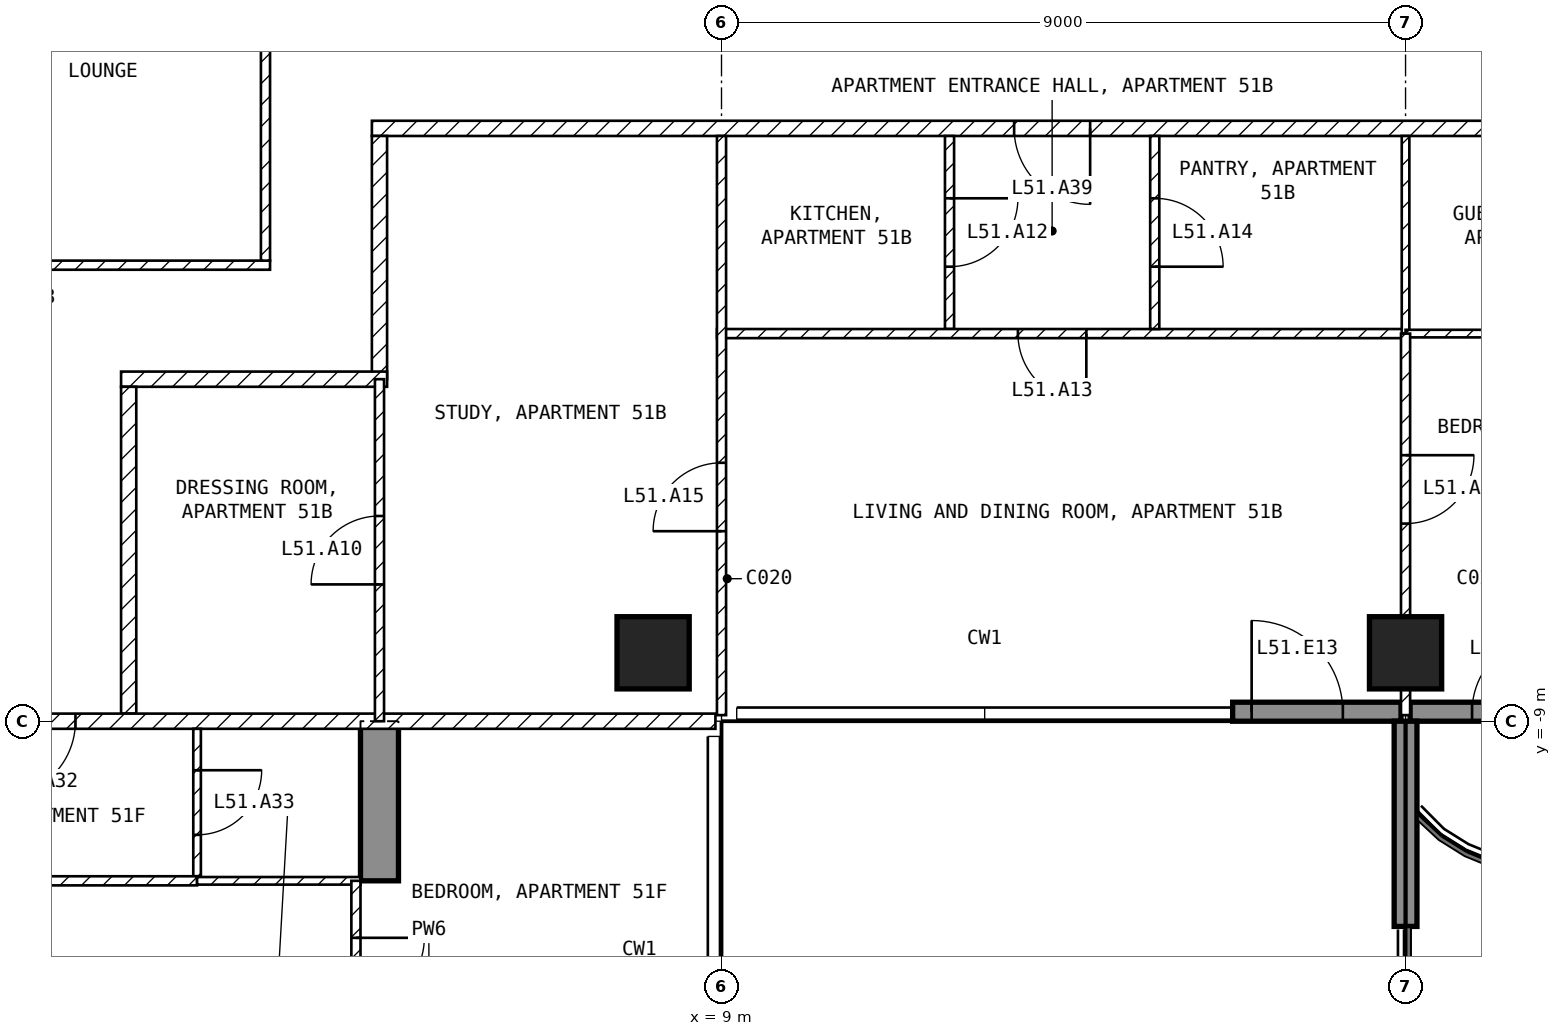
"""IFC4 building model, lengths in metres.
Left out: names, types, materials, properties, quantities, classifications, styles, units other than length and angle.
Written with IfcOpenShell. Run it as: python <this file> out.ifc"""

import sys

from ifc_helpers import new_model, si_unit, direction, frame, frame_2d, origin, origin_2d, place, context, subcontext, project, spatial, polyline, rectangle, outline, extrude, element, fill, save


model = new_model("IFC4")
c1 = context("Model", 3, precision=1e-05, world=origin(), true_north=direction((0.0, 1.0)))
c2 = subcontext(c1, "Body", "Model", "MODEL_VIEW")
j1 = project(units=[si_unit("LENGTHUNIT", "METRE"), si_unit("PLANEANGLEUNIT", "RADIAN")], contexts=[c1])
p1 = place(None, origin())
s1 = spatial("IfcSite", under=j1, at=p1, CompositionType="ELEMENT")
p2 = place(p1, origin())
s2 = spatial("IfcBuilding", under=s1, at=p2, CompositionType="ELEMENT")
p3 = place(p2, frame((0.0, 0.0, 205.1)))
s3 = spatial("IfcBuildingStorey", under=s2, at=p3, CompositionType="ELEMENT", Elevation=205.1)
for number, where, z_axis, x_axis in (
    (1, (8.1, -8.1, -0.25), (0.0, 0.0, 1.0), (1.0, 0.0, 0.0)),
    (2, (18.0, -8.1, -0.25), (0.0, 0.0, 1.0), (1.0, 0.0, 0.0)),
):
    element("IfcColumn", number, at=place(p3, frame(where, z_axis=z_axis, x_axis=x_axis)), inside=s3, PredefinedType="COLUMN", context=c2, shape_type="SweptSolid", body=[
        extrude(rectangle(XDim=0.95, YDim=0.95, at=origin_2d()), origin(), (0.0, 0.0, 1.0), 3.5),
    ])
p4 = place(p3, frame((4.25, -20.225, -0.25), z_axis=(1.0, 0.0, 0.0), x_axis=(0.0, 1.0, 0.0)))
e3 = element("IfcWall", 3, at=p4, inside=s3, PredefinedType="SHEAR", context=c2, shape_type="SweptSolid", body=[
    extrude(outline(polyline([(0.0, 0.0), (6.725, 0.0), (6.725, 2.65), (9.125, 2.65), (9.125, 0.0), (11.225, 0.0), (11.225, 3.5), (0.0, 3.5), (0.0, 0.0)])), origin(), (0.0, 0.0, 1.0), 0.5),
])
p5 = place(p3, frame((15.725, -8.875, 0.0), z_axis=(0.0, 0.0, 1.0), x_axis=(1.0, 0.0, 0.0)))
e4 = element("IfcWall", 4, at=p5, inside=s3, PredefinedType="SOLIDWALL", context=c2, shape_type="SweptSolid", body=[
    extrude(rectangle(XDim=2.215, YDim=0.25, at=frame_2d((1.107, 0.0))), origin(), (0.0, 0.0, 1.0), 3.25),
])
p6 = place(p5, frame((0.25, 0.0, 0.0)))
e5 = element("IfcOpeningElement", 5, at=p6, cuts=e4, PredefinedType="OPENING", context=c2, shape_type="SweptSolid", body=[
    extrude(rectangle(XDim=1.2, YDim=2.4, at=frame_2d((0.6, 1.2))), frame((0.0, 0.135, 0.0), z_axis=(0.0, -1.0, 0.0), x_axis=(1.0, 0.0, 0.0)), (0.0, 0.0, 1.0), 0.27),
])
p7 = place(p3, frame((18.06, -8.875, 0.0), z_axis=(0.0, 0.0, 1.0), x_axis=(1.0, 0.0, 0.0)))
e6 = element("IfcWall", 6, at=p7, inside=s3, PredefinedType="SOLIDWALL", context=c2, shape_type="SweptSolid", body=[
    extrude(rectangle(XDim=3.115, YDim=0.25, at=frame_2d((1.558, 0.0))), origin(), (0.0, 0.0, 1.0), 3.25),
])
p8 = place(p7, frame((0.815, 0.0, 0.0)))
e7 = element("IfcOpeningElement", 7, at=p8, cuts=e6, PredefinedType="OPENING", context=c2, shape_type="SweptSolid", body=[
    extrude(rectangle(XDim=1.0, YDim=2.4, at=frame_2d((0.5, 1.2))), frame((0.0, 0.135, 0.0), z_axis=(0.0, -1.0, 0.0), x_axis=(1.0, 0.0, 0.0)), (0.0, 0.0, 1.0), 0.27),
])
p9 = place(p3, frame((18.0, -9.0, 0.0), z_axis=(0.0, 0.0, 1.0), x_axis=(0.0, -1.0, 0.0)))
e8 = element("IfcWall", 8, at=p9, inside=s3, PredefinedType="SOLIDWALL", context=c2, shape_type="SweptSolid", body=[
    extrude(rectangle(XDim=2.7, YDim=0.3, at=frame_2d((1.35, 0.0))), origin(), (0.0, 0.0, 1.0), 3.25),
])
p10 = place(p3, frame((-3.06, -3.0, 0.0), z_axis=(0.0, 0.0, 1.0), x_axis=(1.0, 0.0, 0.0)))
e9 = element("IfcWall", 9, at=p10, inside=s3, PredefinedType="PARTITIONING", context=c2, shape_type="SweptSolid", body=[
    extrude(rectangle(XDim=6.12, YDim=0.12, at=frame_2d((3.06, 0.0))), origin(), (0.0, 0.0, 1.0), 3.25),
])
p11 = place(p3, frame((3.0, -2.94, 0.0), z_axis=(0.0, 0.0, 1.0), x_axis=(0.0, 1.0, 0.0)))
e10 = element("IfcWall", 10, at=p11, inside=s3, PredefinedType="PARTITIONING", context=c2, shape_type="SweptSolid", body=[
    extrude(rectangle(XDim=5.88, YDim=0.12, at=frame_2d((2.94, 0.0))), origin(), (0.0, 0.0, 1.0), 3.25),
])
p12 = place(p3, frame((21.6, -1.2, 0.0), z_axis=(0.0, 0.0, 1.0), x_axis=(-1.0, 0.0, 0.0)))
e11 = element("IfcWall", 11, at=p12, inside=s3, PredefinedType="PARTITIONING", context=c2, shape_type="SweptSolid", body=[
    extrude(rectangle(XDim=17.2, YDim=0.2, at=frame_2d((8.6, 0.0))), origin(), (0.0, 0.0, 1.0), 3.25),
])
p13 = place(p12, frame((7.75, 0.0, 0.0)))
e12 = element("IfcOpeningElement", 12, at=p13, cuts=e11, PredefinedType="OPENING", context=c2, shape_type="SweptSolid", body=[
    extrude(rectangle(XDim=1.0, YDim=2.1, at=frame_2d((0.5, 1.05))), frame((0.0, 0.11, 0.0), z_axis=(0.0, -1.0, 0.0), x_axis=(1.0, 0.0, 0.0)), (0.0, 0.0, 1.0), 0.22),
])
p14 = place(p3, frame((4.5, -1.3, 0.0), z_axis=(0.0, 0.0, 1.0), x_axis=(0.0, -1.0, 0.0)))
e13 = element("IfcWall", 13, at=p14, inside=s3, PredefinedType="PARTITIONING", context=c2, shape_type="SweptSolid", body=[
    extrude(rectangle(XDim=3.2, YDim=0.2, at=frame_2d((1.6, 0.0))), origin(), (0.0, 0.0, 1.0), 3.25),
])
p15 = place(p3, frame((4.6, -4.5, 0.0), z_axis=(0.0, 0.0, 1.0), x_axis=(-1.0, 0.0, 0.0)))
e14 = element("IfcWall", 14, at=p15, inside=s3, PredefinedType="PARTITIONING", context=c2, shape_type="SweptSolid", body=[
    extrude(rectangle(XDim=3.5, YDim=0.2, at=frame_2d((1.75, 0.0))), origin(), (0.0, 0.0, 1.0), 3.25),
])
p16 = place(p3, frame((1.2, -4.6, 0.0), z_axis=(0.0, 0.0, 1.0), x_axis=(0.0, -1.0, 0.0)))
e15 = element("IfcWall", 15, at=p16, inside=s3, PredefinedType="PARTITIONING", context=c2, shape_type="SweptSolid", body=[
    extrude(rectangle(XDim=4.3, YDim=0.2, at=frame_2d((2.15, 0.0))), origin(), (0.0, 0.0, 1.0), 3.25),
])
p17 = place(p3, frame((8.92, -9.0, 0.0), z_axis=(0.0, 0.0, 1.0), x_axis=(-1.0, 0.0, 0.0)))
e16 = element("IfcWall", 16, at=p17, inside=s3, PredefinedType="PARTITIONING", context=c2, shape_type="SweptSolid", body=[
    extrude(rectangle(XDim=17.84, YDim=0.2, at=frame_2d((8.92, 0.0))), origin(), (0.0, 0.0, 1.0), 3.25),
])
p18 = place(p17, frame((8.42, 0.0, 0.0)))
e17 = element("IfcOpeningElement", 17, at=p18, cuts=e16, PredefinedType="OPENING", context=c2, shape_type="SweptSolid", body=[
    extrude(rectangle(XDim=1.0, YDim=2.1, at=frame_2d((0.5, 1.05))), frame((0.0, 0.11, 0.0), z_axis=(0.0, -1.0, 0.0), x_axis=(1.0, 0.0, 0.0)), (0.0, 0.0, 1.0), 0.22),
])
p19 = place(p3, frame((12.0, -1.3, 0.0), z_axis=(0.0, 0.0, 1.0), x_axis=(0.0, -1.0, 0.0)))
e18 = element("IfcWall", 18, at=p19, inside=s3, PredefinedType="PARTITIONING", context=c2, shape_type="SweptSolid", body=[
    extrude(rectangle(XDim=2.54, YDim=0.12, at=frame_2d((1.27, 0.0))), origin(), (0.0, 0.0, 1.0), 3.25),
])
p20 = place(p19, frame((0.82, 0.0, 0.0)))
e19 = element("IfcOpeningElement", 19, at=p20, cuts=e18, PredefinedType="OPENING", context=c2, shape_type="SweptSolid", body=[
    extrude(rectangle(XDim=0.9, YDim=2.1, at=frame_2d((0.45, 1.05))), frame((0.0, 0.07, 0.0), z_axis=(0.0, -1.0, 0.0), x_axis=(1.0, 0.0, 0.0)), (0.0, 0.0, 1.0), 0.14),
])
p21 = place(p3, frame((18.0, -3.9, 0.0), z_axis=(0.0, 0.0, 1.0), x_axis=(-1.0, 0.0, 0.0)))
e20 = element("IfcWall", 20, at=p21, inside=s3, PredefinedType="PARTITIONING", context=c2, shape_type="SweptSolid", body=[
    extrude(rectangle(XDim=9.06, YDim=0.12, at=frame_2d((4.53, 0.0))), origin(), (0.0, 0.0, 1.0), 3.25),
])
p22 = place(p21, frame((4.2, 0.0, 0.0)))
e21 = element("IfcOpeningElement", 21, at=p22, cuts=e20, PredefinedType="OPENING", context=c2, shape_type="SweptSolid", body=[
    extrude(rectangle(XDim=0.9, YDim=2.1, at=frame_2d((0.45, 1.05))), frame((0.0, 0.07, 0.0), z_axis=(0.0, -1.0, 0.0), x_axis=(1.0, 0.0, 0.0)), (0.0, 0.0, 1.0), 0.14),
])
p23 = place(p3, frame((9.0, -8.92, 0.0), z_axis=(0.0, 0.0, 1.0), x_axis=(0.0, 1.0, 0.0)))
e22 = element("IfcWall", 22, at=p23, inside=s3, PredefinedType="PARTITIONING", context=c2, shape_type="SweptSolid", body=[
    extrude(rectangle(XDim=7.62, YDim=0.12, at=frame_2d((3.81, 0.0))), origin(), (0.0, 0.0, 1.0), 3.25),
])
p24 = place(p23, frame((2.42, 0.0, 0.0)))
e23 = element("IfcOpeningElement", 23, at=p24, cuts=e22, PredefinedType="OPENING", context=c2, shape_type="SweptSolid", body=[
    extrude(rectangle(XDim=0.9, YDim=2.1, at=frame_2d((0.45, 1.05))), frame((0.0, 0.07, 0.0), z_axis=(0.0, -1.0, 0.0), x_axis=(1.0, 0.0, 0.0)), (0.0, 0.0, 1.0), 0.14),
])
p25 = place(p3, frame((14.7, -1.3, 0.0), z_axis=(0.0, 0.0, 1.0), x_axis=(0.0, -1.0, 0.0)))
e24 = element("IfcWall", 24, at=p25, inside=s3, PredefinedType="PARTITIONING", context=c2, shape_type="SweptSolid", body=[
    extrude(rectangle(XDim=2.54, YDim=0.12, at=frame_2d((1.27, 0.0))), origin(), (0.0, 0.0, 1.0), 3.25),
])
p26 = place(p25, frame((0.82, 0.0, 0.0)))
e25 = element("IfcOpeningElement", 25, at=p26, cuts=e24, PredefinedType="OPENING", context=c2, shape_type="SweptSolid", body=[
    extrude(rectangle(XDim=0.9, YDim=2.1, at=frame_2d((0.45, 1.05))), frame((0.0, 0.07, 0.0), z_axis=(0.0, -1.0, 0.0), x_axis=(1.0, 0.0, 0.0)), (0.0, 0.0, 1.0), 0.14),
])
p27 = place(p3, frame((18.0, -1.3, 0.0), z_axis=(0.0, 0.0, 1.0), x_axis=(0.0, -1.0, 0.0)))
e26 = element("IfcWall", 26, at=p27, inside=s3, PredefinedType="PARTITIONING", context=c2, shape_type="SweptSolid", body=[
    extrude(rectangle(XDim=2.6, YDim=0.1, at=frame_2d((1.3, 0.0))), origin(), (0.0, 0.0, 1.0), 2.48),
])
p28 = place(p3, frame((21.6, -3.9, 0.0), z_axis=(0.0, 0.0, 1.0), x_axis=(-1.0, 0.0, 0.0)))
e27 = element("IfcWall", 27, at=p28, inside=s3, PredefinedType="PARTITIONING", context=c2, shape_type="SweptSolid", body=[
    extrude(rectangle(XDim=3.6, YDim=0.1, at=frame_2d((1.8, 0.0))), origin(), (0.0, 0.0, 1.0), 3.25),
])
p29 = place(p28, frame((1.375, 0.0, 0.0)))
e28 = element("IfcOpeningElement", 28, at=p29, cuts=e27, PredefinedType="OPENING", context=c2, shape_type="SweptSolid", body=[
    extrude(rectangle(XDim=0.85, YDim=2.1, at=frame_2d((0.425, 1.05))), frame((0.0, 0.06, 0.0), z_axis=(0.0, -1.0, 0.0), x_axis=(1.0, 0.0, 0.0)), (0.0, 0.0, 1.0), 0.12),
])
p30 = place(p3, frame((18.0, -3.9, 0.0), z_axis=(0.0, 0.0, 1.0), x_axis=(0.0, -1.0, 0.0)))
e29 = element("IfcWall", 29, at=p30, inside=s3, PredefinedType="PARTITIONING", context=c2, shape_type="SweptSolid", body=[
    extrude(rectangle(XDim=5.02, YDim=0.12, at=frame_2d((2.51, 0.0))), origin(), (0.0, 0.0, 1.0), 2.48),
])
p31 = place(p30, frame((1.6, 0.0, 0.0)))
e30 = element("IfcOpeningElement", 30, at=p31, cuts=e29, PredefinedType="OPENING", context=c2, shape_type="SweptSolid", body=[
    extrude(rectangle(XDim=0.9, YDim=2.1, at=frame_2d((0.45, 1.05))), frame((0.0, 0.07, 0.0), z_axis=(0.0, -1.0, 0.0), x_axis=(1.0, 0.0, 0.0)), (0.0, 0.0, 1.0), 0.14),
])
p32 = place(p3, frame((4.5, -9.0, 0.0), z_axis=(0.0, 0.0, 1.0), x_axis=(0.0, 1.0, 0.0)))
e31 = element("IfcWall", 31, at=p32, inside=s3, PredefinedType="PARTITIONING", context=c2, shape_type="SweptSolid", body=[
    extrude(rectangle(XDim=4.5, YDim=0.12, at=frame_2d((2.25, 0.0))), origin(), (0.0, 0.0, 1.0), 3.25),
])
p33 = place(p32, frame((1.8, 0.0, 0.0)))
e32 = element("IfcOpeningElement", 32, at=p33, cuts=e31, PredefinedType="OPENING", context=c2, shape_type="SweptSolid", body=[
    extrude(rectangle(XDim=0.9, YDim=2.1, at=frame_2d((0.45, 1.05))), frame((0.0, 0.07, 0.0), z_axis=(0.0, -1.0, 0.0), x_axis=(1.0, 0.0, 0.0)), (0.0, 0.0, 1.0), 0.14),
])
p34 = place(p3, frame((2.1, -9.1, 0.0), z_axis=(0.0, 0.0, 1.0), x_axis=(0.0, -1.0, 0.0)))
e33 = element("IfcWall", 33, at=p34, inside=s3, PredefinedType="PARTITIONING", context=c2, shape_type="SweptSolid", body=[
    extrude(rectangle(XDim=1.94, YDim=0.1, at=frame_2d((0.97, 0.0))), origin(), (0.0, 0.0, 1.0), 3.25),
])
p35 = place(p34, frame((0.545, 0.0, 0.0)))
e34 = element("IfcOpeningElement", 34, at=p35, cuts=e33, PredefinedType="OPENING", context=c2, shape_type="SweptSolid", body=[
    extrude(rectangle(XDim=0.85, YDim=2.1, at=frame_2d((0.425, 1.05))), frame((0.0, 0.06, 0.0), z_axis=(0.0, -1.0, 0.0), x_axis=(1.0, 0.0, 0.0)), (0.0, 0.0, 1.0), 0.12),
])
p36 = place(p3, frame((2.1, -11.1, 0.0), z_axis=(0.0, 0.0, 1.0), x_axis=(-1.0, 0.0, 0.0)))
e35 = element("IfcWall", 35, at=p36, inside=s3, PredefinedType="PARTITIONING", context=c2, shape_type="SweptSolid", body=[
    extrude(rectangle(XDim=6.35, YDim=0.12, at=frame_2d((3.175, 0.0))), origin(), (0.0, 0.0, 1.0), 3.25),
])
p37 = place(p36, frame((2.725, 0.0, 0.0)))
e36 = element("IfcOpeningElement", 36, at=p37, cuts=e35, PredefinedType="OPENING", context=c2, shape_type="SweptSolid", body=[
    extrude(rectangle(XDim=0.9, YDim=2.1, at=frame_2d((0.45, 1.05))), frame((0.0, 0.07, 0.0), z_axis=(0.0, -1.0, 0.0), x_axis=(1.0, 0.0, 0.0)), (0.0, 0.0, 1.0), 0.14),
])
p38 = place(p3, frame((4.25, -11.1, 0.0), z_axis=(0.0, 0.0, 1.0), x_axis=(-1.0, 0.0, 0.0)))
e37 = element("IfcWall", 37, at=p38, inside=s3, PredefinedType="PARTITIONING", context=c2, shape_type="SweptSolid", body=[
    extrude(rectangle(XDim=2.15, YDim=0.1, at=frame_2d((1.075, 0.0))), origin(), (0.0, 0.0, 1.0), 3.25),
])
p39 = place(p3, frame((4.19, -11.1, 0.0), z_axis=(0.0, 0.0, 1.0), x_axis=(0.0, -1.0, 0.0)))
e38 = element("IfcWall", 38, at=p39, inside=s3, PredefinedType="PARTITIONING", context=c2, shape_type="SweptSolid", body=[
    extrude(rectangle(XDim=2.4, YDim=0.12, at=frame_2d((1.2, 0.0))), origin(), (0.0, 0.0, 1.0), 2.4),
])
p40 = place(p39, frame((0.75, 0.0, 0.0)))
e39 = element("IfcOpeningElement", 39, at=p40, cuts=e38, PredefinedType="OPENING", context=c2, shape_type="SweptSolid", body=[
    extrude(rectangle(XDim=0.9, YDim=2.1, at=frame_2d((0.45, 1.05))), frame((0.0, 0.07, 0.0), z_axis=(0.0, -1.0, 0.0), x_axis=(1.0, 0.0, 0.0)), (0.0, 0.0, 1.0), 0.14),
])
p41 = place(p6, origin())
e40 = element("IfcDoor", 40, at=p41, inside=s3, OperationType="SINGLE_SWING_LEFT", PredefinedType="DOOR", context=c2, shape_type="SweptSolid", body=[
    extrude(rectangle(XDim=1.2, YDim=2.4, at=frame_2d((0.6, 1.2))), frame((0.0, 0.025, 0.0), z_axis=(0.0, -1.0, 0.0), x_axis=(1.0, 0.0, 0.0)), (0.0, 0.0, 1.0), 0.05),
])
fill(e5, e40)
p42 = place(p8, origin())
e41 = element("IfcDoor", 41, at=p42, inside=s3, OperationType="SINGLE_SWING_RIGHT", PredefinedType="DOOR", context=c2, shape_type="SweptSolid", body=[
    extrude(rectangle(XDim=1.0, YDim=2.4, at=frame_2d((0.5, 1.2))), frame((0.0, 0.025, 0.0), z_axis=(0.0, -1.0, 0.0), x_axis=(1.0, 0.0, 0.0)), (0.0, 0.0, 1.0), 0.05),
])
fill(e7, e41)
p43 = place(p31, origin())
e42 = element("IfcDoor", 42, at=p43, inside=s3, OperationType="SINGLE_SWING_LEFT", PredefinedType="DOOR", context=c2, shape_type="SweptSolid", body=[
    extrude(rectangle(XDim=0.9, YDim=2.1, at=frame_2d((0.45, 1.05))), frame((0.0, 0.025, 0.0), z_axis=(0.0, -1.0, 0.0), x_axis=(1.0, 0.0, 0.0)), (0.0, 0.0, 1.0), 0.05),
])
fill(e30, e42)
p44 = place(p33, origin())
e43 = element("IfcDoor", 43, at=p44, inside=s3, OperationType="SINGLE_SWING_LEFT", PredefinedType="DOOR", context=c2, shape_type="SweptSolid", body=[
    extrude(rectangle(XDim=0.9, YDim=2.1, at=frame_2d((0.45, 1.05))), frame((0.0, 0.025, 0.0), z_axis=(0.0, -1.0, 0.0), x_axis=(1.0, 0.0, 0.0)), (0.0, 0.0, 1.0), 0.05),
])
fill(e32, e43)
p45 = place(p20, origin())
e44 = element("IfcDoor", 44, at=p45, inside=s3, OperationType="SINGLE_SWING_LEFT", PredefinedType="DOOR", context=c2, shape_type="SweptSolid", body=[
    extrude(rectangle(XDim=0.9, YDim=2.1, at=frame_2d((0.45, 1.05))), frame((0.0, 0.025, 0.0), z_axis=(0.0, -1.0, 0.0), x_axis=(1.0, 0.0, 0.0)), (0.0, 0.0, 1.0), 0.05),
])
fill(e19, e44)
p46 = place(p22, origin())
e45 = element("IfcDoor", 45, at=p46, inside=s3, OperationType="SINGLE_SWING_LEFT", PredefinedType="DOOR", context=c2, shape_type="SweptSolid", body=[
    extrude(rectangle(XDim=0.9, YDim=2.1, at=frame_2d((0.45, 1.05))), frame((0.0, 0.025, 0.0), z_axis=(0.0, -1.0, 0.0), x_axis=(1.0, 0.0, 0.0)), (0.0, 0.0, 1.0), 0.05),
])
fill(e21, e45)
p47 = place(p26, origin())
e46 = element("IfcDoor", 46, at=p47, inside=s3, OperationType="SINGLE_SWING_RIGHT", PredefinedType="DOOR", context=c2, shape_type="SweptSolid", body=[
    extrude(rectangle(XDim=0.9, YDim=2.1, at=frame_2d((0.45, 1.05))), frame((0.0, 0.025, 0.0), z_axis=(0.0, -1.0, 0.0), x_axis=(1.0, 0.0, 0.0)), (0.0, 0.0, 1.0), 0.05),
])
fill(e25, e46)
p48 = place(p24, origin())
e47 = element("IfcDoor", 47, at=p48, inside=s3, OperationType="SINGLE_SWING_LEFT", PredefinedType="DOOR", context=c2, shape_type="SweptSolid", body=[
    extrude(rectangle(XDim=0.9, YDim=2.1, at=frame_2d((0.45, 1.05))), frame((0.0, 0.025, 0.0), z_axis=(0.0, -1.0, 0.0), x_axis=(1.0, 0.0, 0.0)), (0.0, 0.0, 1.0), 0.05),
])
fill(e23, e47)
p49 = place(p18, origin())
e48 = element("IfcDoor", 48, at=p49, inside=s3, OperationType="SINGLE_SWING_RIGHT", PredefinedType="DOOR", context=c2, shape_type="SweptSolid", body=[
    extrude(rectangle(XDim=1.0, YDim=2.1, at=frame_2d((0.5, 1.05))), frame((0.0, 0.025, 0.0), z_axis=(0.0, -1.0, 0.0), x_axis=(1.0, 0.0, 0.0)), (0.0, 0.0, 1.0), 0.05),
])
fill(e17, e48)
p50 = place(p35, origin())
e49 = element("IfcDoor", 49, at=p50, inside=s3, OperationType="SINGLE_SWING_LEFT", PredefinedType="DOOR", context=c2, shape_type="SweptSolid", body=[
    extrude(rectangle(XDim=0.85, YDim=2.1, at=frame_2d((0.425, 1.05))), frame((0.0, 0.025, 0.0), z_axis=(0.0, -1.0, 0.0), x_axis=(1.0, 0.0, 0.0)), (0.0, 0.0, 1.0), 0.05),
])
fill(e34, e49)
p51 = place(p13, origin())
e50 = element("IfcDoor", 50, at=p51, inside=s3, OperationType="SINGLE_SWING_LEFT", PredefinedType="DOOR", context=c2, shape_type="SweptSolid", body=[
    extrude(rectangle(XDim=1.0, YDim=2.1, at=frame_2d((0.5, 1.05))), frame((0.0, 0.025, 0.0), z_axis=(0.0, -1.0, 0.0), x_axis=(1.0, 0.0, 0.0)), (0.0, 0.0, 1.0), 0.05),
])
fill(e12, e50)
p52 = place(p40, origin())
e51 = element("IfcDoor", 51, at=p52, inside=s3, OperationType="SINGLE_SWING_LEFT", PredefinedType="DOOR", context=c2, shape_type="SweptSolid", body=[
    extrude(rectangle(XDim=0.9, YDim=2.1, at=frame_2d((0.45, 1.05))), frame((0.0, 0.025, 0.0), z_axis=(0.0, -1.0, 0.0), x_axis=(1.0, 0.0, 0.0)), (0.0, 0.0, 1.0), 0.05),
])
fill(e39, e51)
save(model, sys.argv[1])
